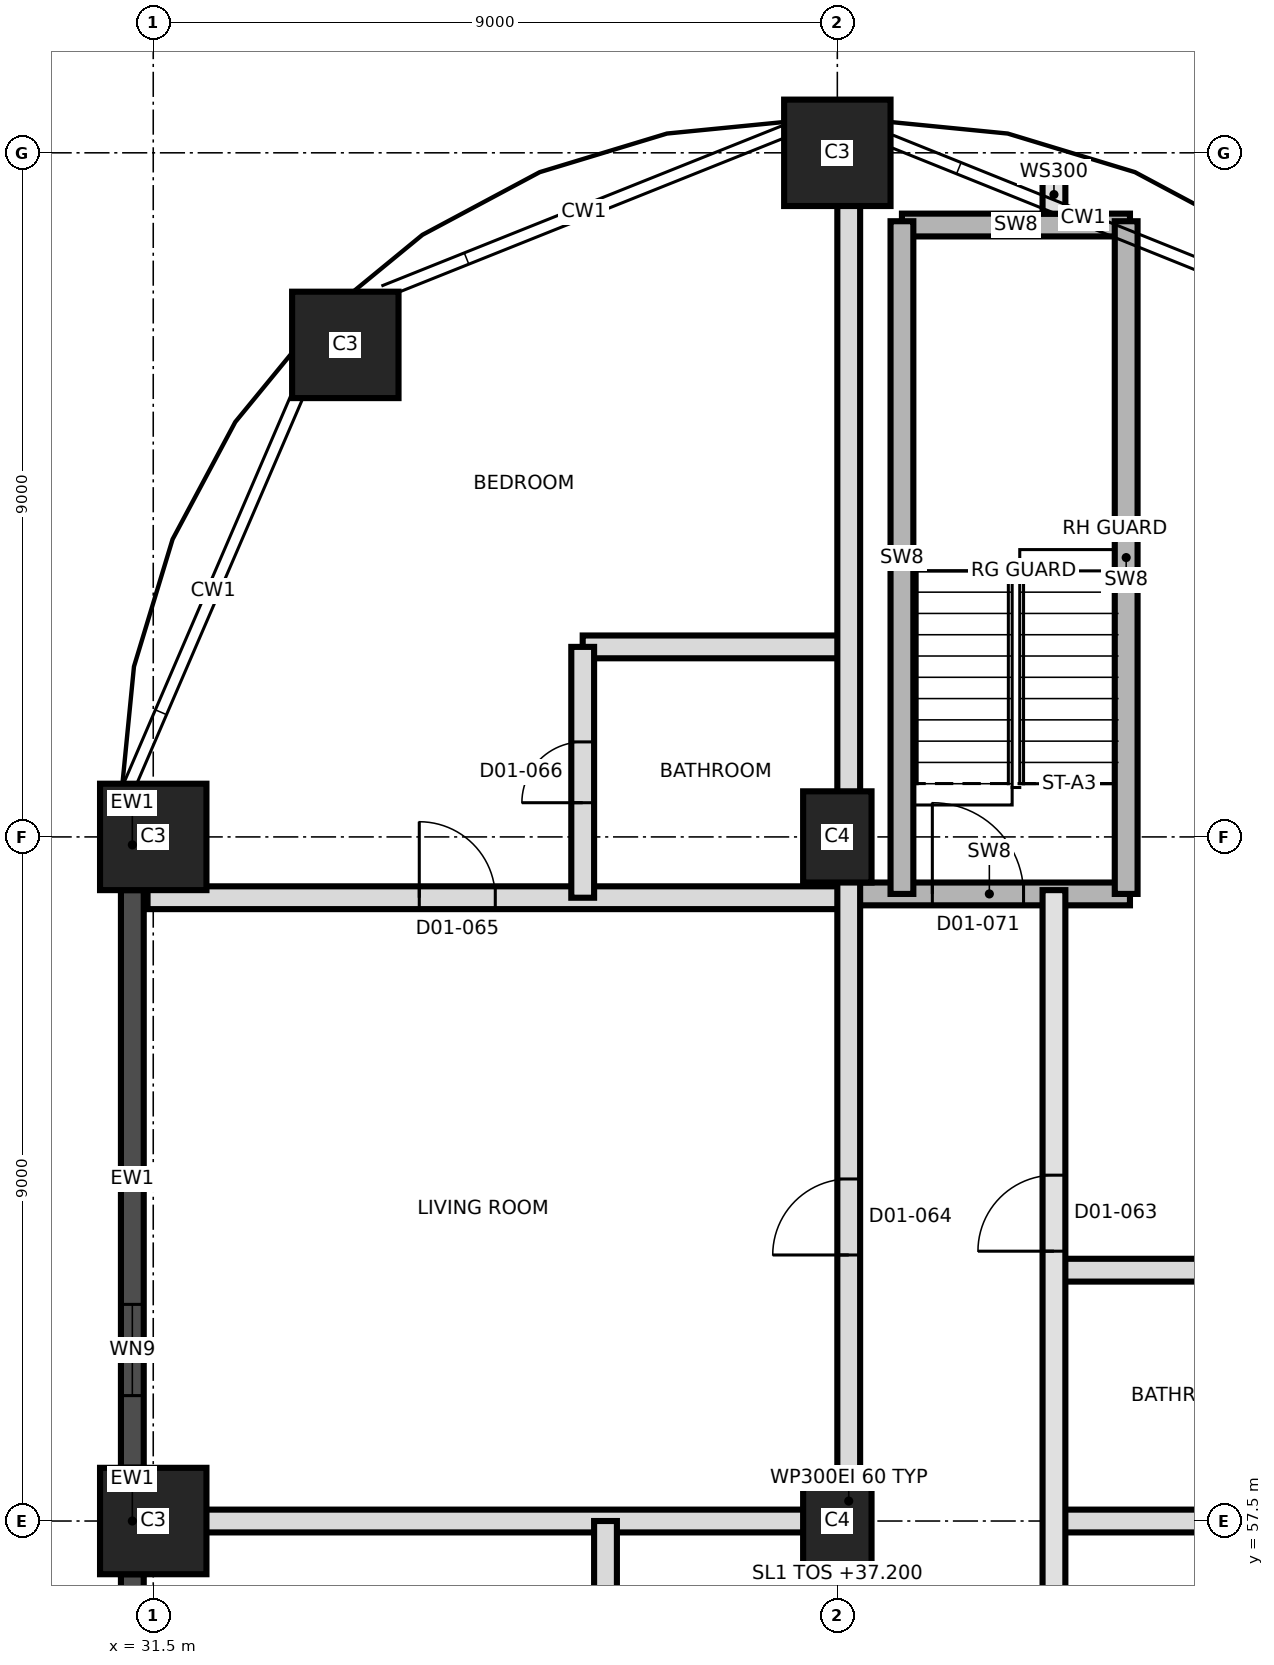
"""IFC4 building model, lengths in metres.
Left out: names, types, materials, properties, quantities, classifications, styles, units other than length and angle.
Written with IfcOpenShell. Run it as: python <this file> out.ifc"""

import sys

from ifc_helpers import new_model, si_unit, direction, frame, frame_2d, origin, origin_2d, place, context, subcontext, project, spatial, rectangle, extrude, element, fill, save


model = new_model("IFC4")
c1 = context("Model", 3, precision=1e-05, world=origin(), true_north=direction((0.0, 1.0)))
c2 = subcontext(c1, "Body", "Model", "MODEL_VIEW")
j1 = project(units=[si_unit("LENGTHUNIT", "METRE"), si_unit("PLANEANGLEUNIT", "RADIAN")], contexts=[c1])
p1 = place(None, origin())
s1 = spatial("IfcSite", under=j1, at=p1, CompositionType="ELEMENT")
p2 = place(p1, origin())
s2 = spatial("IfcBuilding", under=s1, at=p2, CompositionType="ELEMENT")
p3 = place(p2, frame((0.0, 0.0, 37.2)))
s3 = spatial("IfcBuildingStorey", under=s2, at=p3, CompositionType="ELEMENT", Elevation=37.2)
p4 = place(p3, frame((31.5, 57.5, 0.0), z_axis=(0.0, 0.0, 1.0), x_axis=(1.0, 0.0, 0.0)))
e1 = element("IfcColumn", 1, at=p4, inside=s3, PredefinedType="COLUMN", context=c2, shape_type="SweptSolid", body=[
    extrude(rectangle(XDim=1.4, YDim=1.4, at=origin_2d()), origin(), (0.0, 0.0, 1.0), 3.7),
])
p5 = place(p3, frame((40.5, 57.5, 0.0), z_axis=(0.0, 0.0, 1.0), x_axis=(0.0, 1.0, 0.0)))
e2 = element("IfcColumn", 2, at=p5, inside=s3, PredefinedType="COLUMN", context=c2, shape_type="SweptSolid", body=[
    extrude(rectangle(XDim=1.2, YDim=0.9, at=origin_2d()), origin(), (0.0, 0.0, 1.0), 3.7),
])
p6 = place(p3, frame((31.5, 66.5, 0.0), z_axis=(0.0, 0.0, 1.0), x_axis=(1.0, 0.0, 0.0)))
e3 = element("IfcColumn", 3, at=p6, inside=s3, PredefinedType="COLUMN", context=c2, shape_type="SweptSolid", body=[
    extrude(rectangle(XDim=1.4, YDim=1.4, at=origin_2d()), origin(), (0.0, 0.0, 1.0), 3.7),
])
p7 = place(p3, frame((40.5, 66.5, 0.0), z_axis=(0.0, 0.0, 1.0), x_axis=(0.0, 1.0, 0.0)))
e4 = element("IfcColumn", 4, at=p7, inside=s3, PredefinedType="COLUMN", context=c2, shape_type="SweptSolid", body=[
    extrude(rectangle(XDim=1.2, YDim=0.9, at=origin_2d()), origin(), (0.0, 0.0, 1.0), 3.7),
])
for number, where, z_axis, x_axis in (
    (5, (34.027, 72.973, 0.0), (0.0, 0.0, 1.0), (1.0, 0.0, 0.0)),
    (6, (40.5, 75.5, 0.0), (0.0, 0.0, 1.0), (1.0, 0.0, 0.0)),
):
    element("IfcColumn", number, at=place(p3, frame(where, z_axis=z_axis, x_axis=x_axis)), inside=s3, PredefinedType="COLUMN", context=c2, shape_type="SweptSolid", body=[
        extrude(rectangle(XDim=1.4, YDim=1.4, at=origin_2d()), origin(), (0.0, 0.0, 1.0), 3.7),
    ])
p8 = place(p3, frame((31.225, 66.992, 0.0), z_axis=(0.0, 0.0, 1.0), x_axis=(0.0, -1.0, 0.0)))
e7 = element("IfcWall", 7, at=p8, inside=s3, PredefinedType="SOLIDWALL", context=c2, shape_type="SweptSolid", body=[
    extrude(rectangle(XDim=1.192, YDim=0.3, at=frame_2d((0.596, 0.0))), origin(), (0.0, 0.0, 1.0), 3.4),
])
p9 = place(p3, frame((31.225, 65.8, 0.0), z_axis=(0.0, 0.0, 1.0), x_axis=(0.0, -1.0, 0.0)))
e8 = element("IfcWall", 8, at=p9, inside=s3, PredefinedType="SOLIDWALL", context=c2, shape_type="SweptSolid", body=[
    extrude(rectangle(XDim=7.6, YDim=0.3, at=frame_2d((3.8, 0.0))), origin(), (0.0, 0.0, 1.0), 2.7),
])
p10 = place(p9, frame((5.45, 0.0, 0.9)))
e9 = element("IfcOpeningElement", 9, at=p10, cuts=e8, PredefinedType="OPENING", context=c2, shape_type="SweptSolid", body=[
    extrude(rectangle(XDim=1.2, YDim=1.5, at=frame_2d((0.6, 0.75))), frame((0.0, 0.16, 0.0), z_axis=(0.0, -1.0, 0.0), x_axis=(1.0, 0.0, 0.0)), (0.0, 0.0, 1.0), 0.32),
])
p11 = place(p3, frame((31.225, 58.2, 0.0), z_axis=(0.0, 0.0, 1.0), x_axis=(0.0, -1.0, 0.0)))
e10 = element("IfcWall", 10, at=p11, inside=s3, PredefinedType="SOLIDWALL", context=c2, shape_type="SweptSolid", body=[
    extrude(rectangle(XDim=1.4, YDim=0.3, at=frame_2d((0.7, 0.0))), origin(), (0.0, 0.0, 1.0), 3.4),
])
p12 = place(p3, frame((31.225, 56.8, 0.0), z_axis=(0.0, 0.0, 1.0), x_axis=(0.0, -1.0, 0.0)))
e11 = element("IfcWall", 11, at=p12, inside=s3, PredefinedType="SOLIDWALL", context=c2, shape_type="SweptSolid", body=[
    extrude(rectangle(XDim=7.6, YDim=0.3, at=frame_2d((3.8, 0.0))), origin(), (0.0, 0.0, 1.0), 2.7),
])
p13 = place(p12, frame((0.95, 0.0, 0.9)))
e12 = element("IfcOpeningElement", 12, at=p13, cuts=e11, PredefinedType="OPENING", context=c2, shape_type="SweptSolid", body=[
    extrude(rectangle(XDim=1.2, YDim=1.5, at=frame_2d((0.6, 0.75))), frame((0.0, 0.16, 0.0), z_axis=(0.0, -1.0, 0.0), x_axis=(1.0, 0.0, 0.0)), (0.0, 0.0, 1.0), 0.32),
])
p14 = place(p12, frame((5.45, 0.0, 0.9)))
e13 = element("IfcOpeningElement", 13, at=p14, cuts=e11, PredefinedType="OPENING", context=c2, shape_type="SweptSolid", body=[
    extrude(rectangle(XDim=1.2, YDim=1.5, at=frame_2d((0.6, 0.75))), frame((0.0, 0.16, 0.0), z_axis=(0.0, -1.0, 0.0), x_axis=(1.0, 0.0, 0.0)), (0.0, 0.0, 1.0), 0.32),
])
p15 = place(p3, frame((31.425, 57.5, 0.0), z_axis=(0.0, 0.0, 1.0), x_axis=(1.0, 0.0, 0.0)))
e14 = element("IfcWall", 14, at=p15, inside=s3, PredefinedType="PARTITIONING", context=c2, shape_type="SweptSolid", body=[
    extrude(rectangle(XDim=9.225, YDim=0.3, at=frame_2d((4.612, 0.0))), origin(), (0.0, 0.0, 1.0), 3.4),
])
p16 = place(p3, frame((43.35, 57.5, 0.0), z_axis=(0.0, 0.0, 1.0), x_axis=(1.0, 0.0, 0.0)))
e15 = element("IfcWall", 15, at=p16, inside=s3, PredefinedType="PARTITIONING", context=c2, shape_type="SweptSolid", body=[
    extrude(rectangle(XDim=6.225, YDim=0.3, at=frame_2d((3.112, 0.0))), origin(), (0.0, 0.0, 1.0), 3.4),
])
p17 = place(p3, frame((43.35, 60.8, 0.0), z_axis=(0.0, 0.0, 1.0), x_axis=(1.0, 0.0, 0.0)))
e16 = element("IfcWall", 16, at=p17, inside=s3, PredefinedType="PARTITIONING", context=c2, shape_type="SweptSolid", body=[
    extrude(rectangle(XDim=3.5, YDim=0.3, at=frame_2d((1.75, 0.0))), origin(), (0.0, 0.0, 1.0), 3.4),
])
p18 = place(p3, frame((31.425, 65.7, 0.0), z_axis=(0.0, 0.0, 1.0), x_axis=(1.0, 0.0, 0.0)))
e17 = element("IfcWall", 17, at=p18, inside=s3, PredefinedType="PARTITIONING", context=c2, shape_type="SweptSolid", body=[
    extrude(rectangle(XDim=9.225, YDim=0.3, at=frame_2d((4.612, 0.0))), origin(), (0.0, 0.0, 1.0), 3.4),
])
p19 = place(p18, frame((3.575, 0.0, 0.0)))
e18 = element("IfcOpeningElement", 18, at=p19, cuts=e17, PredefinedType="OPENING", context=c2, shape_type="SweptSolid", body=[
    extrude(rectangle(XDim=1.0, YDim=2.1, at=frame_2d((0.5, 1.05))), frame((0.0, 0.16, 0.0), z_axis=(0.0, -1.0, 0.0), x_axis=(1.0, 0.0, 0.0)), (0.0, 0.0, 1.0), 0.32),
])
p20 = place(p3, frame((40.65, 65.75, 0.0), z_axis=(0.0, 0.0, 1.0), x_axis=(1.0, 0.0, 0.0)))
e19 = element("IfcWall", 19, at=p20, inside=s3, PredefinedType="SHEAR", context=c2, shape_type="SweptSolid", body=[
    extrude(rectangle(XDim=3.7, YDim=0.3, at=frame_2d((1.85, 0.0))), origin(), (0.0, 0.0, 1.0), 3.4),
])
p21 = place(p20, frame((1.1, 0.0, 0.0)))
e20 = element("IfcOpeningElement", 20, at=p21, cuts=e19, PredefinedType="OPENING", context=c2, shape_type="SweptSolid", body=[
    extrude(rectangle(XDim=1.2, YDim=2.1, at=frame_2d((0.6, 1.05))), frame((0.0, 0.16, 0.0), z_axis=(0.0, -1.0, 0.0), x_axis=(1.0, 0.0, 0.0)), (0.0, 0.0, 1.0), 0.32),
])
p22 = place(p3, frame((37.15, 69.0, 0.0), z_axis=(0.0, 0.0, 1.0), x_axis=(1.0, 0.0, 0.0)))
e21 = element("IfcWall", 21, at=p22, inside=s3, PredefinedType="PARTITIONING", context=c2, shape_type="SweptSolid", body=[
    extrude(rectangle(XDim=3.5, YDim=0.3, at=frame_2d((1.75, 0.0))), origin(), (0.0, 0.0, 1.0), 3.4),
])
p23 = place(p3, frame((41.35, 74.55, 0.0), z_axis=(0.0, 0.0, 1.0), x_axis=(1.0, 0.0, 0.0)))
e22 = element("IfcWall", 22, at=p23, inside=s3, PredefinedType="SHEAR", context=c2, shape_type="SweptSolid", body=[
    extrude(rectangle(XDim=3.0, YDim=0.3, at=frame_2d((1.5, 0.0))), origin(), (0.0, 0.0, 1.0), 3.4),
])
p24 = place(p3, frame((37.15, 65.7, 0.0), z_axis=(0.0, 0.0, 1.0), x_axis=(0.0, 1.0, 0.0)))
e23 = element("IfcWall", 23, at=p24, inside=s3, PredefinedType="PARTITIONING", context=c2, shape_type="SweptSolid", body=[
    extrude(rectangle(XDim=3.3, YDim=0.3, at=frame_2d((1.65, 0.0))), origin(), (0.0, 0.0, 1.0), 3.4),
])
p25 = place(p24, frame((1.25, 0.0, 0.0)))
e24 = element("IfcOpeningElement", 24, at=p25, cuts=e23, PredefinedType="OPENING", context=c2, shape_type="SweptSolid", body=[
    extrude(rectangle(XDim=0.8, YDim=2.1, at=frame_2d((0.4, 1.05))), frame((0.0, 0.16, 0.0), z_axis=(0.0, -1.0, 0.0), x_axis=(1.0, 0.0, 0.0)), (0.0, 0.0, 1.0), 0.32),
])
p26 = place(p3, frame((37.45, 54.8, 0.0), z_axis=(0.0, 0.0, 1.0), x_axis=(0.0, 1.0, 0.0)))
e25 = element("IfcWall", 25, at=p26, inside=s3, PredefinedType="PARTITIONING", context=c2, shape_type="SweptSolid", body=[
    extrude(rectangle(XDim=2.7, YDim=0.3, at=frame_2d((1.35, 0.0))), origin(), (0.0, 0.0, 1.0), 3.4),
])
p27 = place(p26, frame((0.95, 0.0, 0.0)))
e26 = element("IfcOpeningElement", 26, at=p27, cuts=e25, PredefinedType="OPENING", context=c2, shape_type="SweptSolid", body=[
    extrude(rectangle(XDim=0.8, YDim=2.1, at=frame_2d((0.4, 1.05))), frame((0.0, 0.16, 0.0), z_axis=(0.0, -1.0, 0.0), x_axis=(1.0, 0.0, 0.0)), (0.0, 0.0, 1.0), 0.32),
])
p28 = place(p3, frame((40.65, 39.95, 0.0), z_axis=(0.0, 0.0, 1.0), x_axis=(0.0, 1.0, 0.0)))
e27 = element("IfcWall", 27, at=p28, inside=s3, PredefinedType="PARTITIONING", context=c2, shape_type="SweptSolid", body=[
    extrude(rectangle(XDim=35.625, YDim=0.3, at=frame_2d((17.812, 0.0))), origin(), (0.0, 0.0, 1.0), 3.4),
])
p29 = place(p28, frame((2.83, 0.0, 0.0)))
e28 = element("IfcOpeningElement", 28, at=p29, cuts=e27, PredefinedType="OPENING", context=c2, shape_type="SweptSolid", body=[
    extrude(rectangle(XDim=1.0, YDim=2.1, at=frame_2d((0.5, 1.05))), frame((0.0, 0.16, 0.0), z_axis=(0.0, -1.0, 0.0), x_axis=(1.0, 0.0, 0.0)), (0.0, 0.0, 1.0), 0.32),
])
p30 = place(p28, frame((4.63, 0.0, 0.0)))
e29 = element("IfcOpeningElement", 29, at=p30, cuts=e27, PredefinedType="OPENING", context=c2, shape_type="SweptSolid", body=[
    extrude(rectangle(XDim=1.0, YDim=2.1, at=frame_2d((0.5, 1.05))), frame((0.0, 0.16, 0.0), z_axis=(0.0, -1.0, 0.0), x_axis=(1.0, 0.0, 0.0)), (0.0, 0.0, 1.0), 0.32),
])
p31 = place(p28, frame((11.47, 0.0, 0.0)))
e30 = element("IfcOpeningElement", 30, at=p31, cuts=e27, PredefinedType="OPENING", context=c2, shape_type="SweptSolid", body=[
    extrude(rectangle(XDim=1.0, YDim=2.1, at=frame_2d((0.5, 1.05))), frame((0.0, 0.16, 0.0), z_axis=(0.0, -1.0, 0.0), x_axis=(1.0, 0.0, 0.0)), (0.0, 0.0, 1.0), 0.32),
])
p32 = place(p28, frame((13.27, 0.0, 0.0)))
e31 = element("IfcOpeningElement", 31, at=p32, cuts=e27, PredefinedType="OPENING", context=c2, shape_type="SweptSolid", body=[
    extrude(rectangle(XDim=1.0, YDim=2.1, at=frame_2d((0.5, 1.05))), frame((0.0, 0.16, 0.0), z_axis=(0.0, -1.0, 0.0), x_axis=(1.0, 0.0, 0.0)), (0.0, 0.0, 1.0), 0.32),
])
p33 = place(p28, frame((21.05, 0.0, 0.0)))
e32 = element("IfcOpeningElement", 32, at=p33, cuts=e27, PredefinedType="OPENING", context=c2, shape_type="SweptSolid", body=[
    extrude(rectangle(XDim=1.0, YDim=2.4, at=frame_2d((0.5, 1.2))), frame((0.0, 0.16, 0.0), z_axis=(0.0, -1.0, 0.0), x_axis=(1.0, 0.0, 0.0)), (0.0, 0.0, 1.0), 0.32),
])
p34 = place(p3, frame((41.35, 65.75, 0.0), z_axis=(0.0, 0.0, 1.0), x_axis=(0.0, 1.0, 0.0)))
e33 = element("IfcWall", 33, at=p34, inside=s3, PredefinedType="SHEAR", context=c2, shape_type="SweptSolid", body=[
    extrude(rectangle(XDim=8.85, YDim=0.3, at=frame_2d((4.425, 0.0))), origin(), (0.0, 0.0, 1.0), 3.4),
])
p35 = place(p3, frame((43.35, 39.95, 0.0), z_axis=(0.0, 0.0, 1.0), x_axis=(0.0, 1.0, 0.0)))
e34 = element("IfcWall", 34, at=p35, inside=s3, PredefinedType="SOLIDWALL", context=c2, shape_type="SweptSolid", body=[
    extrude(rectangle(XDim=25.85, YDim=0.3, at=frame_2d((12.925, 0.0))), origin(), (0.0, 0.0, 1.0), 3.4),
])
p36 = place(p35, frame((2.47, 0.0, 0.0)))
e35 = element("IfcOpeningElement", 35, at=p36, cuts=e34, PredefinedType="OPENING", context=c2, shape_type="SweptSolid", body=[
    extrude(rectangle(XDim=1.0, YDim=2.1, at=frame_2d((0.5, 1.05))), frame((0.0, 0.16, 0.0), z_axis=(0.0, -1.0, 0.0), x_axis=(1.0, 0.0, 0.0)), (0.0, 0.0, 1.0), 0.32),
])
p37 = place(p35, frame((4.27, 0.0, 0.0)))
e36 = element("IfcOpeningElement", 36, at=p37, cuts=e34, PredefinedType="OPENING", context=c2, shape_type="SweptSolid", body=[
    extrude(rectangle(XDim=1.0, YDim=2.1, at=frame_2d((0.5, 1.05))), frame((0.0, 0.16, 0.0), z_axis=(0.0, -1.0, 0.0), x_axis=(1.0, 0.0, 0.0)), (0.0, 0.0, 1.0), 0.32),
])
p38 = place(p35, frame((11.65, 0.0, 0.0)))
e37 = element("IfcOpeningElement", 37, at=p38, cuts=e34, PredefinedType="OPENING", context=c2, shape_type="SweptSolid", body=[
    extrude(rectangle(XDim=1.0, YDim=2.1, at=frame_2d((0.5, 1.05))), frame((0.0, 0.16, 0.0), z_axis=(0.0, -1.0, 0.0), x_axis=(1.0, 0.0, 0.0)), (0.0, 0.0, 1.0), 0.32),
])
p39 = place(p35, frame((13.45, 0.0, 0.0)))
e38 = element("IfcOpeningElement", 38, at=p39, cuts=e34, PredefinedType="OPENING", context=c2, shape_type="SweptSolid", body=[
    extrude(rectangle(XDim=1.0, YDim=2.1, at=frame_2d((0.5, 1.05))), frame((0.0, 0.16, 0.0), z_axis=(0.0, -1.0, 0.0), x_axis=(1.0, 0.0, 0.0)), (0.0, 0.0, 1.0), 0.32),
])
p40 = place(p35, frame((21.1, 0.0, 0.0)))
e39 = element("IfcOpeningElement", 39, at=p40, cuts=e34, PredefinedType="OPENING", context=c2, shape_type="SweptSolid", body=[
    extrude(rectangle(XDim=1.0, YDim=2.4, at=frame_2d((0.5, 1.2))), frame((0.0, 0.16, 0.0), z_axis=(0.0, -1.0, 0.0), x_axis=(1.0, 0.0, 0.0)), (0.0, 0.0, 1.0), 0.32),
])
p41 = place(p3, frame((43.35, 74.699, 0.0), z_axis=(0.0, 0.0, 1.0), x_axis=(0.0, 1.0, 0.0)))
e40 = element("IfcWall", 40, at=p41, inside=s3, PredefinedType="SOLIDWALL", context=c2, shape_type="SweptSolid", body=[
    extrude(rectangle(XDim=0.504, YDim=0.3, at=frame_2d((0.252, 0.0))), origin(), (0.0, 0.0, 1.0), 3.4),
])
p42 = place(p3, frame((44.3, 65.75, 0.0), z_axis=(0.0, 0.0, 1.0), x_axis=(0.0, 1.0, 0.0)))
e41 = element("IfcWall", 41, at=p42, inside=s3, PredefinedType="SHEAR", context=c2, shape_type="SweptSolid", body=[
    extrude(rectangle(XDim=8.85, YDim=0.3, at=frame_2d((4.425, 0.0))), origin(), (0.0, 0.0, 1.0), 3.4),
])
p43 = place(p10, origin())
e42 = element("IfcWindow", 42, at=p43, inside=s3, PartitioningType="SINGLE_PANEL", PredefinedType="WINDOW", context=c2, shape_type="SweptSolid", body=[
    extrude(rectangle(XDim=1.2, YDim=1.5, at=frame_2d((0.6, 0.75))), frame((0.0, 0.03, 0.0), z_axis=(0.0, -1.0, 0.0), x_axis=(1.0, 0.0, 0.0)), (0.0, 0.0, 1.0), 0.06),
])
fill(e9, e42)
p44 = place(p40, origin())
e43 = element("IfcDoor", 43, at=p44, inside=s3, OperationType="SINGLE_SWING_RIGHT", PredefinedType="DOOR", context=c2, shape_type="SweptSolid", body=[
    extrude(rectangle(XDim=1.0, YDim=2.4, at=frame_2d((0.5, 1.2))), frame((0.0, 0.025, 0.0), z_axis=(0.0, -1.0, 0.0), x_axis=(1.0, 0.0, 0.0)), (0.0, 0.0, 1.0), 0.05),
])
fill(e39, e43)
p45 = place(p33, origin())
e44 = element("IfcDoor", 44, at=p45, inside=s3, OperationType="SINGLE_SWING_LEFT", PredefinedType="DOOR", context=c2, shape_type="SweptSolid", body=[
    extrude(rectangle(XDim=1.0, YDim=2.4, at=frame_2d((0.5, 1.2))), frame((0.0, 0.025, 0.0), z_axis=(0.0, -1.0, 0.0), x_axis=(1.0, 0.0, 0.0)), (0.0, 0.0, 1.0), 0.05),
])
fill(e32, e44)
p46 = place(p19, origin())
e45 = element("IfcDoor", 45, at=p46, inside=s3, OperationType="SINGLE_SWING_RIGHT", PredefinedType="DOOR", context=c2, shape_type="SweptSolid", body=[
    extrude(rectangle(XDim=1.0, YDim=2.1, at=frame_2d((0.5, 1.05))), frame((0.0, 0.025, 0.0), z_axis=(0.0, -1.0, 0.0), x_axis=(1.0, 0.0, 0.0)), (0.0, 0.0, 1.0), 0.05),
])
fill(e18, e45)
p47 = place(p25, origin())
e46 = element("IfcDoor", 46, at=p47, inside=s3, OperationType="SINGLE_SWING_LEFT", PredefinedType="DOOR", context=c2, shape_type="SweptSolid", body=[
    extrude(rectangle(XDim=0.8, YDim=2.1, at=frame_2d((0.4, 1.05))), frame((0.0, 0.025, 0.0), z_axis=(0.0, -1.0, 0.0), x_axis=(1.0, 0.0, 0.0)), (0.0, 0.0, 1.0), 0.05),
])
fill(e24, e46)
p48 = place(p21, origin())
e47 = element("IfcDoor", 47, at=p48, inside=s3, OperationType="SINGLE_SWING_RIGHT", PredefinedType="DOOR", context=c2, shape_type="SweptSolid", body=[
    extrude(rectangle(XDim=1.2, YDim=2.1, at=frame_2d((0.6, 1.05))), frame((0.0, 0.025, 0.0), z_axis=(0.0, -1.0, 0.0), x_axis=(1.0, 0.0, 0.0)), (0.0, 0.0, 1.0), 0.05),
])
fill(e20, e47)
save(model, sys.argv[1])
